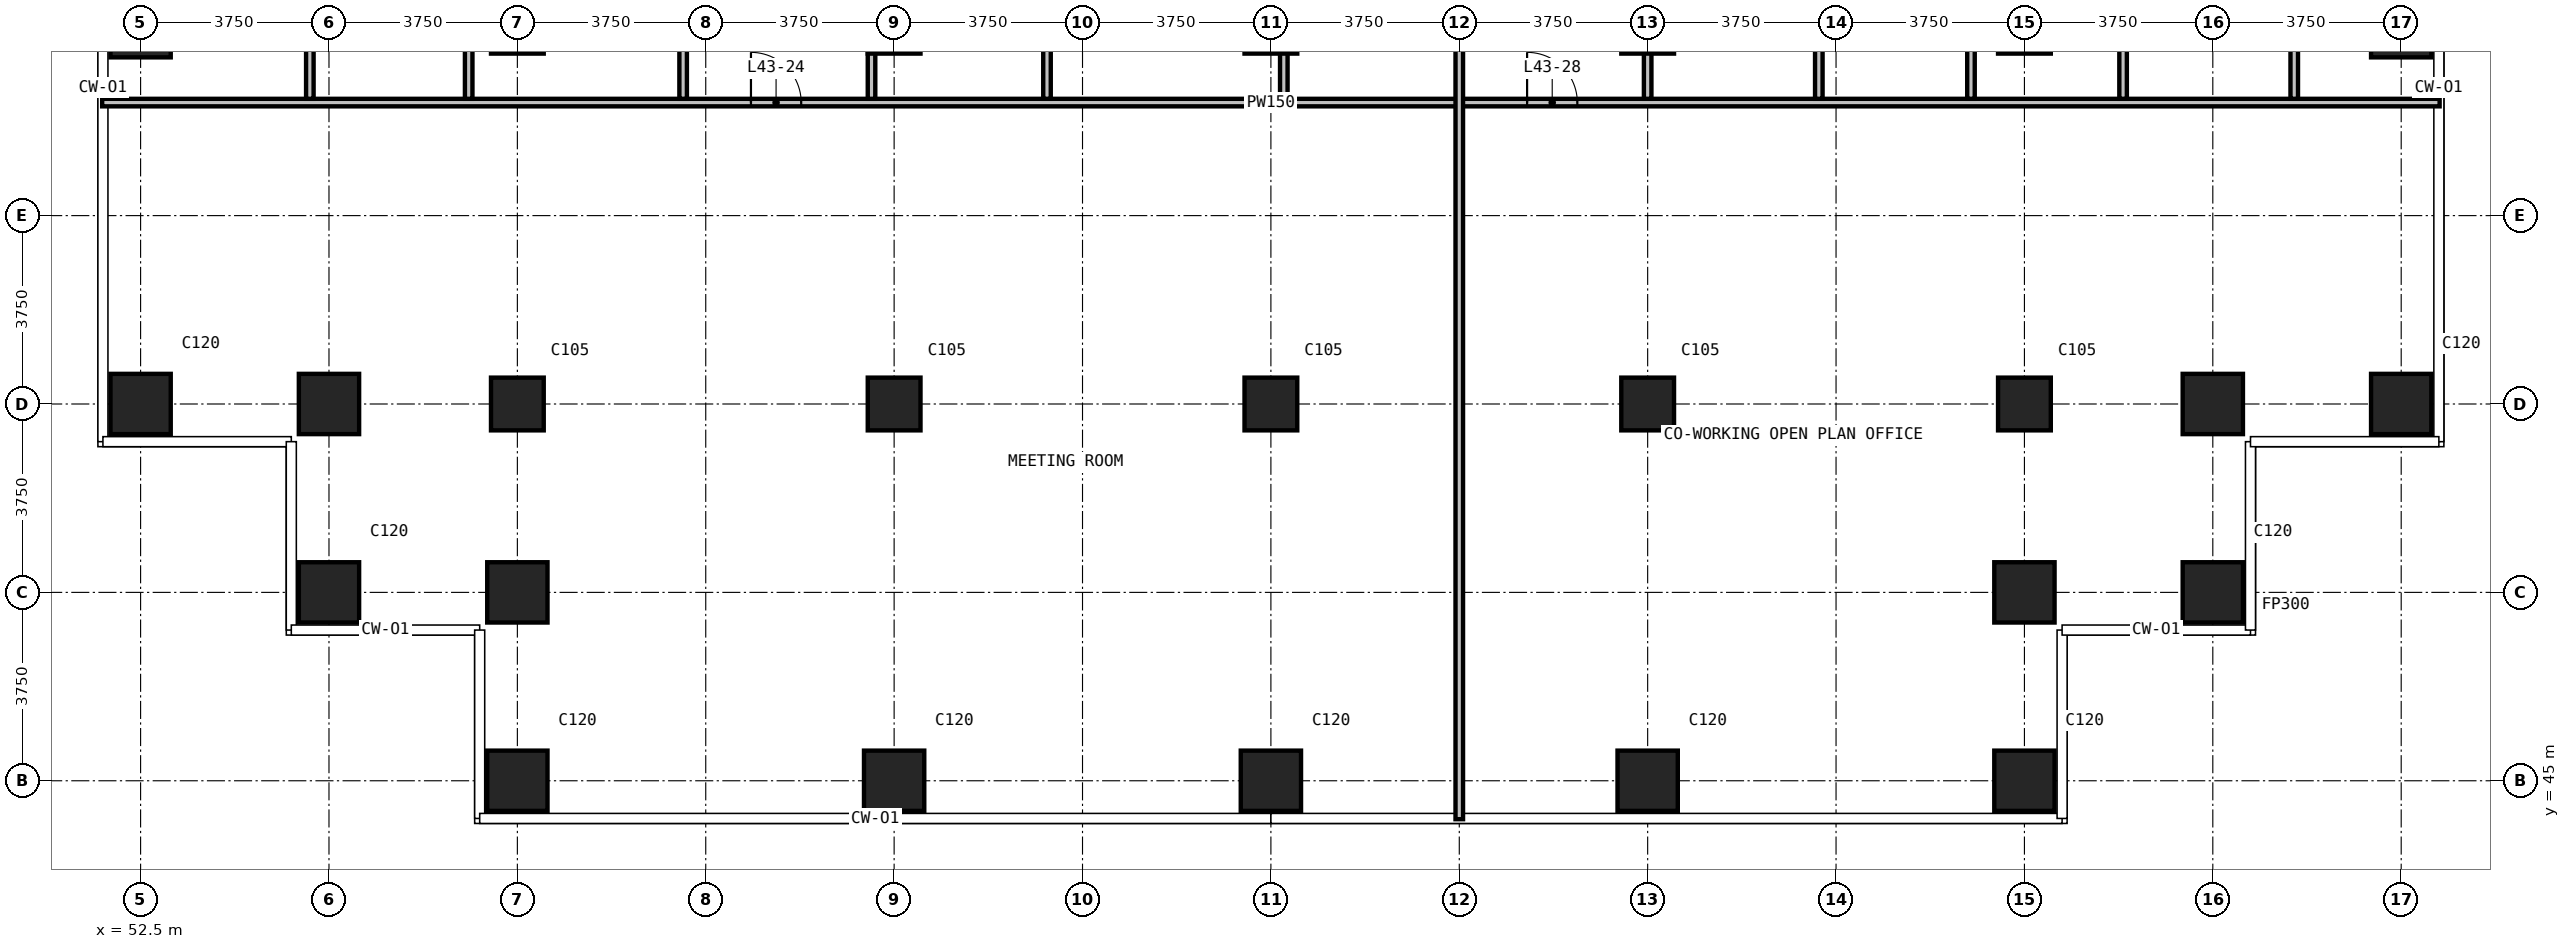
"""IFC4 building model, lengths in metres.
Left out: names, types, materials, properties, quantities, classifications, styles, units other than length and angle.
Written with IfcOpenShell. Run it as: python <this file> out.ifc"""

import sys

from ifc_helpers import new_model, si_unit, direction, frame, frame_2d, origin, origin_2d, place, context, subcontext, project, spatial, rectangle, extrude, element, fill, save


model = new_model("IFC4")
c1 = context("Model", 3, precision=1e-05, world=origin(), true_north=direction((0.0, 1.0)))
c2 = subcontext(c1, "Body", "Model", "MODEL_VIEW")
j1 = project(units=[si_unit("LENGTHUNIT", "METRE"), si_unit("PLANEANGLEUNIT", "RADIAN")], contexts=[c1])
p1 = place(None, origin())
s1 = spatial("IfcSite", under=j1, at=p1, CompositionType="ELEMENT")
p2 = place(p1, origin())
s2 = spatial("IfcBuilding", under=s1, at=p2, CompositionType="ELEMENT")
p3 = place(p2, frame((0.0, 0.0, 169.3)))
s3 = spatial("IfcBuildingStorey", under=s2, at=p3, CompositionType="ELEMENT", Elevation=169.3)
for number, where, z_axis, x_axis in (
    (1, (52.5, 52.5, 0.0), (0.0, 0.0, 1.0), (1.0, 0.0, 0.0)),
    (2, (52.5, 60.0, 0.0), (0.0, 0.0, 1.0), (1.0, 0.0, 0.0)),
    (3, (56.25, 48.75, 0.0), (0.0, 0.0, 1.0), (1.0, 0.0, 0.0)),
    (4, (56.25, 52.5, 0.0), (0.0, 0.0, 1.0), (1.0, 0.0, 0.0)),
    (5, (60.0, 45.0, 0.0), (0.0, 0.0, 1.0), (1.0, 0.0, 0.0)),
    (6, (60.0, 48.75, 0.0), (0.0, 0.0, 1.0), (1.0, 0.0, 0.0)),
):
    element("IfcColumn", number, at=place(p3, frame(where, z_axis=z_axis, x_axis=x_axis)), inside=s3, PredefinedType="COLUMN", context=c2, shape_type="SweptSolid", body=[
        extrude(rectangle(XDim=1.2, YDim=1.2, at=origin_2d()), origin(), (0.0, 0.0, 1.0), 3.6),
    ])
for number, where, z_axis, x_axis in (
    (7, (60.0, 52.5, 0.0), (0.0, 0.0, 1.0), (1.0, 0.0, 0.0)),
    (8, (60.0, 60.0, 0.0), (0.0, 0.0, 1.0), (1.0, 0.0, 0.0)),
):
    element("IfcColumn", number, at=place(p3, frame(where, z_axis=z_axis, x_axis=x_axis)), inside=s3, PredefinedType="COLUMN", context=c2, shape_type="SweptSolid", body=[
        extrude(rectangle(XDim=1.05, YDim=1.05, at=origin_2d()), origin(), (0.0, 0.0, 1.0), 3.6),
    ])
p4 = place(p3, frame((67.5, 45.0, 0.0), z_axis=(0.0, 0.0, 1.0), x_axis=(1.0, 0.0, 0.0)))
e9 = element("IfcColumn", 9, at=p4, inside=s3, PredefinedType="COLUMN", context=c2, shape_type="SweptSolid", body=[
    extrude(rectangle(XDim=1.2, YDim=1.2, at=origin_2d()), origin(), (0.0, 0.0, 1.0), 3.6),
])
for number, where, z_axis, x_axis in (
    (10, (67.5, 52.5, 0.0), (0.0, 0.0, 1.0), (1.0, 0.0, 0.0)),
    (11, (67.5, 60.0, 0.0), (0.0, 0.0, 1.0), (1.0, 0.0, 0.0)),
):
    element("IfcColumn", number, at=place(p3, frame(where, z_axis=z_axis, x_axis=x_axis)), inside=s3, PredefinedType="COLUMN", context=c2, shape_type="SweptSolid", body=[
        extrude(rectangle(XDim=1.05, YDim=1.05, at=origin_2d()), origin(), (0.0, 0.0, 1.0), 3.6),
    ])
p5 = place(p3, frame((75.0, 45.0, 0.0), z_axis=(0.0, 0.0, 1.0), x_axis=(1.0, 0.0, 0.0)))
e12 = element("IfcColumn", 12, at=p5, inside=s3, PredefinedType="COLUMN", context=c2, shape_type="SweptSolid", body=[
    extrude(rectangle(XDim=1.2, YDim=1.2, at=origin_2d()), origin(), (0.0, 0.0, 1.0), 3.6),
])
for number, where, z_axis, x_axis in (
    (13, (75.0, 52.5, 0.0), (0.0, 0.0, 1.0), (1.0, 0.0, 0.0)),
    (14, (75.0, 60.0, 0.0), (0.0, 0.0, 1.0), (1.0, 0.0, 0.0)),
):
    element("IfcColumn", number, at=place(p3, frame(where, z_axis=z_axis, x_axis=x_axis)), inside=s3, PredefinedType="COLUMN", context=c2, shape_type="SweptSolid", body=[
        extrude(rectangle(XDim=1.05, YDim=1.05, at=origin_2d()), origin(), (0.0, 0.0, 1.0), 3.6),
    ])
p6 = place(p3, frame((82.5, 45.0, 0.0), z_axis=(0.0, 0.0, 1.0), x_axis=(1.0, 0.0, 0.0)))
e15 = element("IfcColumn", 15, at=p6, inside=s3, PredefinedType="COLUMN", context=c2, shape_type="SweptSolid", body=[
    extrude(rectangle(XDim=1.2, YDim=1.2, at=origin_2d()), origin(), (0.0, 0.0, 1.0), 3.6),
])
for number, where, z_axis, x_axis in (
    (16, (82.5, 52.5, 0.0), (0.0, 0.0, 1.0), (1.0, 0.0, 0.0)),
    (17, (82.5, 60.0, 0.0), (0.0, 0.0, 1.0), (1.0, 0.0, 0.0)),
):
    element("IfcColumn", number, at=place(p3, frame(where, z_axis=z_axis, x_axis=x_axis)), inside=s3, PredefinedType="COLUMN", context=c2, shape_type="SweptSolid", body=[
        extrude(rectangle(XDim=1.05, YDim=1.05, at=origin_2d()), origin(), (0.0, 0.0, 1.0), 3.6),
    ])
for number, where, z_axis, x_axis in (
    (18, (90.0, 45.0, 0.0), (0.0, 0.0, 1.0), (1.0, 0.0, 0.0)),
    (19, (90.0, 48.75, 0.0), (0.0, 0.0, 1.0), (1.0, 0.0, 0.0)),
):
    element("IfcColumn", number, at=place(p3, frame(where, z_axis=z_axis, x_axis=x_axis)), inside=s3, PredefinedType="COLUMN", context=c2, shape_type="SweptSolid", body=[
        extrude(rectangle(XDim=1.2, YDim=1.2, at=origin_2d()), origin(), (0.0, 0.0, 1.0), 3.6),
    ])
for number, where, z_axis, x_axis in (
    (20, (90.0, 52.5, 0.0), (0.0, 0.0, 1.0), (1.0, 0.0, 0.0)),
    (21, (90.0, 60.0, 0.0), (0.0, 0.0, 1.0), (1.0, 0.0, 0.0)),
):
    element("IfcColumn", number, at=place(p3, frame(where, z_axis=z_axis, x_axis=x_axis)), inside=s3, PredefinedType="COLUMN", context=c2, shape_type="SweptSolid", body=[
        extrude(rectangle(XDim=1.05, YDim=1.05, at=origin_2d()), origin(), (0.0, 0.0, 1.0), 3.6),
    ])
for number, where, z_axis, x_axis in (
    (22, (93.75, 48.75, 0.0), (0.0, 0.0, 1.0), (1.0, 0.0, 0.0)),
    (23, (93.75, 52.5, 0.0), (0.0, 0.0, 1.0), (1.0, 0.0, 0.0)),
    (24, (97.5, 52.5, 0.0), (0.0, 0.0, 1.0), (1.0, 0.0, 0.0)),
    (25, (97.5, 60.0, 0.0), (0.0, 0.0, 1.0), (1.0, 0.0, 0.0)),
):
    element("IfcColumn", number, at=place(p3, frame(where, z_axis=z_axis, x_axis=x_axis)), inside=s3, PredefinedType="COLUMN", context=c2, shape_type="SweptSolid", body=[
        extrude(rectangle(XDim=1.2, YDim=1.2, at=origin_2d()), origin(), (0.0, 0.0, 1.0), 3.6),
    ])
p7 = place(p3, frame((51.735, 58.5, 0.0), z_axis=(0.0, 0.0, 1.0), x_axis=(1.0, 0.0, 0.0)))
e26 = element("IfcWall", 26, at=p7, inside=s3, PredefinedType="PARTITIONING", context=c2, shape_type="SweptSolid", body=[
    extrude(rectangle(XDim=46.53, YDim=0.15, at=frame_2d((23.265, 0.0))), origin(), (0.0, 0.0, 1.0), 3.3),
])
p8 = place(p7, frame((12.915, 0.0, 0.0)))
e27 = element("IfcOpeningElement", 27, at=p8, cuts=e26, PredefinedType="OPENING", context=c2, shape_type="SweptSolid", body=[
    extrude(rectangle(XDim=1.0, YDim=2.2, at=frame_2d((0.5, 1.1))), frame((0.0, 0.085, 0.0), z_axis=(0.0, -1.0, 0.0), x_axis=(1.0, 0.0, 0.0)), (0.0, 0.0, 1.0), 0.17),
])
p9 = place(p7, frame((28.365, 0.0, 0.0)))
e28 = element("IfcOpeningElement", 28, at=p9, cuts=e26, PredefinedType="OPENING", context=c2, shape_type="SweptSolid", body=[
    extrude(rectangle(XDim=1.0, YDim=2.2, at=frame_2d((0.5, 1.1))), frame((0.0, 0.085, 0.0), z_axis=(0.0, -1.0, 0.0), x_axis=(1.0, 0.0, 0.0)), (0.0, 0.0, 1.0), 0.17),
])
for number, where, z_axis, x_axis in (
    (29, (55.869, 58.575, 0.0), (0.0, 0.0, 1.0), (0.0, 1.0, 0.0)),
    (30, (59.031, 58.575, 0.0), (0.0, 0.0, 1.0), (0.0, 1.0, 0.0)),
    (31, (63.3, 58.575, 0.0), (0.0, 0.0, 1.0), (0.0, 1.0, 0.0)),
    (32, (67.05, 58.575, 0.0), (0.0, 0.0, 1.0), (0.0, 1.0, 0.0)),
    (33, (70.543, 58.575, 0.0), (0.0, 0.0, 1.0), (0.0, 1.0, 0.0)),
    (34, (75.257, 58.575, 0.0), (0.0, 0.0, 1.0), (0.0, 1.0, 0.0)),
):
    element("IfcWall", number, at=place(p3, frame(where, z_axis=z_axis, x_axis=x_axis)), inside=s3, PredefinedType="PARTITIONING", context=c2, shape_type="SweptSolid", body=[
        extrude(rectangle(XDim=4.325, YDim=0.15, at=frame_2d((2.163, 0.0))), origin(), (0.0, 0.0, 1.0), 3.3),
    ])
p10 = place(p3, frame((78.75, 44.235, 0.0), z_axis=(0.0, 0.0, 1.0), x_axis=(0.0, 1.0, 0.0)))
e35 = element("IfcWall", 35, at=p10, inside=s3, PredefinedType="PARTITIONING", context=c2, shape_type="SweptSolid", body=[
    extrude(rectangle(XDim=18.665, YDim=0.15, at=frame_2d((9.333, 0.0))), origin(), (0.0, 0.0, 1.0), 3.3),
])
for number, where, z_axis, x_axis in (
    (36, (82.5, 58.575, 0.0), (0.0, 0.0, 1.0), (0.0, 1.0, 0.0)),
    (37, (85.907, 58.575, 0.0), (0.0, 0.0, 1.0), (0.0, 1.0, 0.0)),
    (38, (88.936, 58.575, 0.0), (0.0, 0.0, 1.0), (0.0, 1.0, 0.0)),
    (39, (91.964, 58.575, 0.0), (0.0, 0.0, 1.0), (0.0, 1.0, 0.0)),
    (40, (95.371, 58.575, 0.0), (0.0, 0.0, 1.0), (0.0, 1.0, 0.0)),
):
    element("IfcWall", number, at=place(p3, frame(where, z_axis=z_axis, x_axis=x_axis)), inside=s3, PredefinedType="PARTITIONING", context=c2, shape_type="SweptSolid", body=[
        extrude(rectangle(XDim=4.325, YDim=0.15, at=frame_2d((2.163, 0.0))), origin(), (0.0, 0.0, 1.0), 3.3),
    ])
p11 = place(p8, origin())
e41 = element("IfcDoor", 41, at=p11, inside=s3, OperationType="SINGLE_SWING_LEFT", PredefinedType="DOOR", context=c2, shape_type="SweptSolid", body=[
    extrude(rectangle(XDim=1.0, YDim=2.2, at=frame_2d((0.5, 1.1))), frame((0.0, 0.025, 0.0), z_axis=(0.0, -1.0, 0.0), x_axis=(1.0, 0.0, 0.0)), (0.0, 0.0, 1.0), 0.05),
])
fill(e27, e41)
p12 = place(p9, origin())
e42 = element("IfcDoor", 42, at=p12, inside=s3, OperationType="SINGLE_SWING_LEFT", PredefinedType="DOOR", context=c2, shape_type="SweptSolid", body=[
    extrude(rectangle(XDim=1.0, YDim=2.2, at=frame_2d((0.5, 1.1))), frame((0.0, 0.025, 0.0), z_axis=(0.0, -1.0, 0.0), x_axis=(1.0, 0.0, 0.0)), (0.0, 0.0, 1.0), 0.05),
])
fill(e28, e42)
save(model, sys.argv[1])
